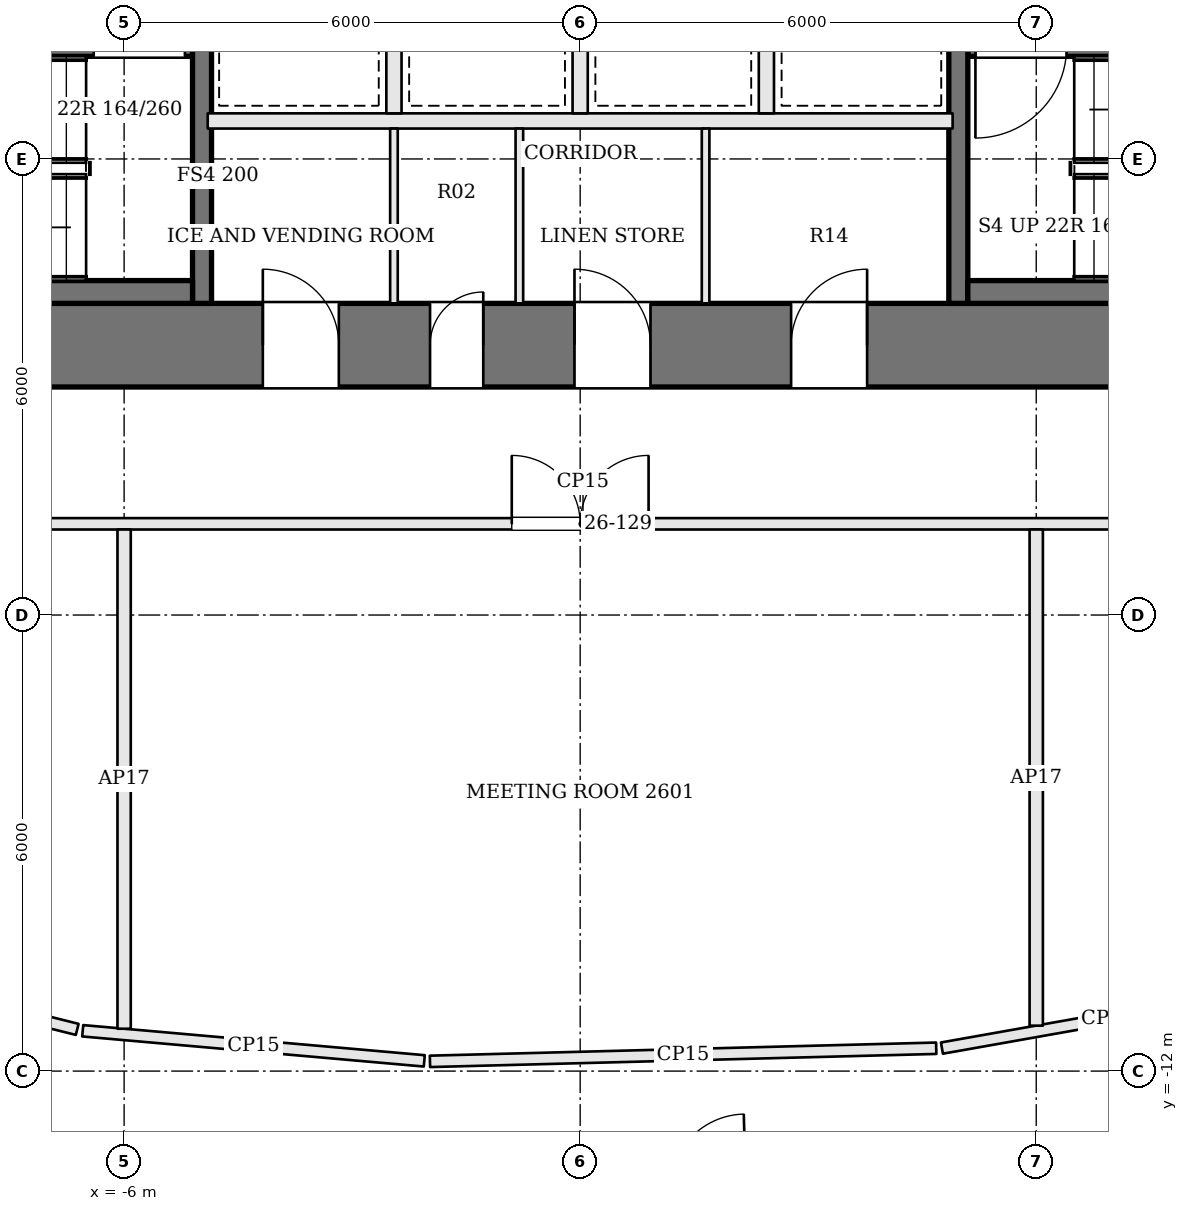
"""IFC4 building model, lengths in metres.
Left out: names, types, materials, properties, quantities, classifications, styles, units other than length and angle.
Written with IfcOpenShell. Run it as: python <this file> out.ifc"""

import sys

from ifc_helpers import new_model, si_unit, direction, frame, frame_2d, origin, place, context, subcontext, project, spatial, rectangle, extrude, element, fill, save


model = new_model("IFC4")
c1 = context("Model", 3, precision=1e-05, world=origin(), true_north=direction((0.0, 1.0)))
c2 = subcontext(c1, "Body", "Model", "MODEL_VIEW")
j1 = project(units=[si_unit("LENGTHUNIT", "METRE"), si_unit("PLANEANGLEUNIT", "RADIAN")], contexts=[c1])
p1 = place(None, origin())
s1 = spatial("IfcSite", under=j1, at=p1, CompositionType="ELEMENT")
p2 = place(p1, origin())
s2 = spatial("IfcBuilding", under=s1, at=p2, CompositionType="ELEMENT")
p3 = place(p2, frame((0.0, 0.0, 110.4)))
s3 = spatial("IfcBuildingStorey", under=s2, at=p3, CompositionType="ELEMENT", Elevation=110.4)
p4 = place(p3, frame((-13.0, -2.45, 0.0), z_axis=(0.0, 0.0, 1.0), x_axis=(1.0, 0.0, 0.0)))
e1 = element("IfcWall", 1, at=p4, inside=s3, PredefinedType="SHEAR", context=c2, shape_type="SweptSolid", body=[
    extrude(rectangle(XDim=26.0, YDim=1.1, at=frame_2d((13.0, 0.0))), origin(), (0.0, 0.0, 1.0), 3.6),
])
p5 = place(p4, frame((8.825, 0.0, 0.0)))
e2 = element("IfcOpeningElement", 2, at=p5, cuts=e1, PredefinedType="OPENING", context=c2, shape_type="SweptSolid", body=[
    extrude(rectangle(XDim=1.0, YDim=2.1, at=frame_2d((0.5, 1.05))), frame((0.0, 0.56, 0.0), z_axis=(0.0, -1.0, 0.0), x_axis=(1.0, 0.0, 0.0)), (0.0, 0.0, 1.0), 1.12),
])
p6 = place(p4, frame((11.025, 0.0, 0.0)))
e3 = element("IfcOpeningElement", 3, at=p6, cuts=e1, PredefinedType="OPENING", context=c2, shape_type="SweptSolid", body=[
    extrude(rectangle(XDim=0.7, YDim=2.1, at=frame_2d((0.35, 1.05))), frame((0.0, 0.56, 0.0), z_axis=(0.0, -1.0, 0.0), x_axis=(1.0, 0.0, 0.0)), (0.0, 0.0, 1.0), 1.12),
])
p7 = place(p4, frame((12.925, 0.0, 0.0)))
e4 = element("IfcOpeningElement", 4, at=p7, cuts=e1, PredefinedType="OPENING", context=c2, shape_type="SweptSolid", body=[
    extrude(rectangle(XDim=1.0, YDim=2.1, at=frame_2d((0.5, 1.05))), frame((0.0, 0.56, 0.0), z_axis=(0.0, -1.0, 0.0), x_axis=(1.0, 0.0, 0.0)), (0.0, 0.0, 1.0), 1.12),
])
p8 = place(p4, frame((15.775, 0.0, 0.0)))
e5 = element("IfcOpeningElement", 5, at=p8, cuts=e1, PredefinedType="OPENING", context=c2, shape_type="SweptSolid", body=[
    extrude(rectangle(XDim=1.0, YDim=2.1, at=frame_2d((0.5, 1.05))), frame((0.0, 0.56, 0.0), z_axis=(0.0, -1.0, 0.0), x_axis=(1.0, 0.0, 0.0)), (0.0, 0.0, 1.0), 1.12),
])
p9 = place(p3, frame((-11.9, 1.475, 0.0), z_axis=(0.0, 0.0, 1.0), x_axis=(1.0, 0.0, 0.0)))
e6 = element("IfcWall", 6, at=p9, inside=s3, PredefinedType="SOLIDWALL", context=c2, shape_type="SweptSolid", body=[
    extrude(rectangle(XDim=6.8, YDim=0.25, at=frame_2d((3.4, 0.0))), origin(), (0.0, 0.0, 1.0), 3.4),
])
p10 = place(p9, frame((5.5, 0.0, 0.0)))
e7 = element("IfcOpeningElement", 7, at=p10, cuts=e6, PredefinedType="OPENING", context=c2, shape_type="SweptSolid", body=[
    extrude(rectangle(XDim=1.2, YDim=2.1, at=frame_2d((0.6, 1.05))), frame((0.0, 0.135, 0.0), z_axis=(0.0, -1.0, 0.0), x_axis=(1.0, 0.0, 0.0)), (0.0, 0.0, 1.0), 0.27),
])
p11 = place(p3, frame((11.9, 1.475, 0.0), z_axis=(0.0, 0.0, 1.0), x_axis=(-1.0, 0.0, 0.0)))
e8 = element("IfcWall", 8, at=p11, inside=s3, PredefinedType="SOLIDWALL", context=c2, shape_type="SweptSolid", body=[
    extrude(rectangle(XDim=6.8, YDim=0.25, at=frame_2d((3.4, 0.0))), origin(), (0.0, 0.0, 1.0), 3.4),
])
p12 = place(p11, frame((5.5, 0.0, 0.0)))
e9 = element("IfcOpeningElement", 9, at=p12, cuts=e8, PredefinedType="OPENING", context=c2, shape_type="SweptSolid", body=[
    extrude(rectangle(XDim=1.2, YDim=2.1, at=frame_2d((0.6, 1.05))), frame((0.0, 0.135, 0.0), z_axis=(0.0, -1.0, 0.0), x_axis=(1.0, 0.0, 0.0)), (0.0, 0.0, 1.0), 0.27),
])
p13 = place(p3, frame((-4.975, -1.9, 0.0), z_axis=(0.0, 0.0, 1.0), x_axis=(0.0, 1.0, 0.0)))
e10 = element("IfcWall", 10, at=p13, inside=s3, PredefinedType="SOLIDWALL", context=c2, shape_type="SweptSolid", body=[
    extrude(rectangle(XDim=12.8, YDim=0.25, at=frame_2d((6.4, 0.0))), origin(), (0.0, 0.0, 1.0), 3.4),
])
p14 = place(p13, frame((4.95, 0.0, 0.0)))
e11 = element("IfcOpeningElement", 11, at=p14, cuts=e10, PredefinedType="OPENING", context=c2, shape_type="SweptSolid", body=[
    extrude(rectangle(XDim=1.2, YDim=2.1, at=frame_2d((0.6, 1.05))), frame((0.0, 0.135, 0.0), z_axis=(0.0, -1.0, 0.0), x_axis=(1.0, 0.0, 0.0)), (0.0, 0.0, 1.0), 0.27),
])
p15 = place(p3, frame((4.975, 10.9, 0.0), z_axis=(0.0, 0.0, 1.0), x_axis=(0.0, -1.0, 0.0)))
e12 = element("IfcWall", 12, at=p15, inside=s3, PredefinedType="SOLIDWALL", context=c2, shape_type="SweptSolid", body=[
    extrude(rectangle(XDim=12.8, YDim=0.25, at=frame_2d((6.4, 0.0))), origin(), (0.0, 0.0, 1.0), 3.4),
])
p16 = place(p15, frame((4.95, 0.0, 0.0)))
e13 = element("IfcOpeningElement", 13, at=p16, cuts=e12, PredefinedType="OPENING", context=c2, shape_type="SweptSolid", body=[
    extrude(rectangle(XDim=1.2, YDim=2.1, at=frame_2d((0.6, 1.05))), frame((0.0, 0.135, 0.0), z_axis=(0.0, -1.0, 0.0), x_axis=(1.0, 0.0, 0.0)), (0.0, 0.0, 1.0), 0.27),
])
for number, where, z_axis, x_axis in (
    (14, (-11.9, -1.75, 0.0), (0.0, 0.0, 1.0), (1.0, 0.0, 0.0)),
    (15, (11.9, -1.75, 0.0), (0.0, 0.0, 1.0), (-1.0, 0.0, 0.0)),
):
    element("IfcWall", number, at=place(p3, frame(where, z_axis=z_axis, x_axis=x_axis)), inside=s3, PredefinedType="SOLIDWALL", context=c2, shape_type="SweptSolid", body=[
        extrude(rectangle(XDim=6.8, YDim=0.3, at=frame_2d((3.4, 0.0))), origin(), (0.0, 0.0, 1.0), 3.4),
    ])
p17 = place(p3, frame((-4.9, 0.5, 0.0), z_axis=(0.0, 0.0, 1.0), x_axis=(1.0, 0.0, 0.0)))
e16 = element("IfcWall", 16, at=p17, inside=s3, PredefinedType="SOLIDWALL", context=c2, shape_type="SweptSolid", body=[
    extrude(rectangle(XDim=9.8, YDim=0.2, at=frame_2d((4.9, 0.0))), origin(), (0.0, 0.0, 1.0), 3.4),
])
for number, where, z_axis, x_axis in (
    (17, (-2.45, 0.6, 0.0), (0.0, 0.0, 1.0), (0.0, 1.0, 0.0)),
    (18, (0.0, 0.6, 0.0), (0.0, 0.0, 1.0), (0.0, 1.0, 0.0)),
    (19, (2.45, 0.6, 0.0), (0.0, 0.0, 1.0), (0.0, 1.0, 0.0)),
):
    element("IfcWall", number, at=place(p3, frame(where, z_axis=z_axis, x_axis=x_axis)), inside=s3, PredefinedType="SOLIDWALL", context=c2, shape_type="SweptSolid", body=[
        extrude(rectangle(XDim=2.2, YDim=0.2, at=frame_2d((1.1, 0.0))), origin(), (0.0, 0.0, 1.0), 3.4),
    ])
for number, where, z_axis, x_axis in (
    (20, (-2.45, -1.9, 0.0), (0.0, 0.0, 1.0), (0.0, 1.0, 0.0)),
    (21, (-0.8, -1.9, 0.0), (0.0, 0.0, 1.0), (0.0, 1.0, 0.0)),
    (22, (1.65, -1.9, 0.0), (0.0, 0.0, 1.0), (0.0, 1.0, 0.0)),
):
    element("IfcWall", number, at=place(p3, frame(where, z_axis=z_axis, x_axis=x_axis)), inside=s3, PredefinedType="PARTITIONING", context=c2, shape_type="SweptSolid", body=[
        extrude(rectangle(XDim=2.3, YDim=0.1, at=frame_2d((1.15, 0.0))), origin(), (0.0, 0.0, 1.0), 3.4),
    ])
p18 = place(p3, frame((-11.419, -12.096, 0.0), z_axis=(0.0, 0.0, 1.0), x_axis=(0.969625924548, -0.244592654109, 0.0)))
e23 = element("IfcWall", 23, at=p18, inside=s3, PredefinedType="PARTITIONING", context=c2, shape_type="SweptSolid", body=[
    extrude(rectangle(XDim=4.718, YDim=0.15, at=frame_2d((2.359, 0.0))), origin(), (0.0, 0.0, 1.0), 2.784),
])
p19 = place(p3, frame((5.015, -13.48, 0.0), z_axis=(0.0, 0.0, 1.0), x_axis=(0.984634298251, 0.174629031689, 0.0)))
e24 = element("IfcWall", 24, at=p19, inside=s3, PredefinedType="PARTITIONING", context=c2, shape_type="SweptSolid", body=[
    extrude(rectangle(XDim=3.928, YDim=0.15, at=frame_2d((1.964, 0.0))), origin(), (0.0, 0.0, 1.0), 2.784),
])
p20 = place(p19, frame((2.051, 0.0, 0.0)))
e25 = element("IfcOpeningElement", 25, at=p20, cuts=e24, PredefinedType="OPENING", context=c2, shape_type="SweptSolid", body=[
    extrude(rectangle(XDim=1.0, YDim=2.1, at=frame_2d((0.5, 1.05))), frame((0.0, 0.085, 0.0), z_axis=(0.0, -1.0, 0.0), x_axis=(1.0, 0.0, 0.0)), (0.0, 0.0, 1.0), 0.17),
])
p21 = place(p3, frame((9.115, -10.925, 0.0), z_axis=(0.0, 0.0, 1.0), x_axis=(-0.984632605417, -0.174638576352, 0.0)))
e26 = element("IfcWall", 26, at=p21, inside=s3, PredefinedType="PARTITIONING", context=c2, shape_type="SweptSolid", body=[
    extrude(rectangle(XDim=4.423, YDim=0.15, at=frame_2d((2.211, 0.0))), origin(), (0.0, 0.0, 1.0), 2.784),
])
p22 = place(p3, frame((4.684, -11.699, 0.0), z_axis=(0.0, 0.0, 1.0), x_axis=(-0.999663438204, -0.025942442425, 0.0)))
e27 = element("IfcWall", 27, at=p22, inside=s3, PredefinedType="PARTITIONING", context=c2, shape_type="SweptSolid", body=[
    extrude(rectangle(XDim=6.663, YDim=0.15, at=frame_2d((3.332, 0.0))), origin(), (0.0, 0.0, 1.0), 2.784),
])
p23 = place(p3, frame((-2.051, -11.865, 0.0), z_axis=(0.0, 0.0, 1.0), x_axis=(-0.996139599493, 0.087783246245, 0.0)))
e28 = element("IfcWall", 28, at=p23, inside=s3, PredefinedType="PARTITIONING", context=c2, shape_type="SweptSolid", body=[
    extrude(rectangle(XDim=4.511, YDim=0.15, at=frame_2d((2.255, 0.0))), origin(), (0.0, 0.0, 1.0), 2.784),
])
p24 = place(p3, frame((-6.617, -11.451, 0.0), z_axis=(0.0, 0.0, 1.0), x_axis=(-0.969987441267, 0.243155020069, 0.0)))
e29 = element("IfcWall", 29, at=p24, inside=s3, PredefinedType="PARTITIONING", context=c2, shape_type="SweptSolid", body=[
    extrude(rectangle(XDim=4.359, YDim=0.15, at=frame_2d((2.179, 0.0))), origin(), (0.0, 0.0, 1.0), 2.784),
])
p25 = place(p3, frame((-14.725, -4.8, 0.0), z_axis=(0.0, 0.0, 1.0), x_axis=(1.0, 0.0, 0.0)))
e30 = element("IfcWall", 30, at=p25, inside=s3, PredefinedType="PARTITIONING", context=c2, shape_type="SweptSolid", body=[
    extrude(rectangle(XDim=29.525, YDim=0.15, at=frame_2d((14.763, 0.0))), origin(), (0.0, 0.0, 1.0), 2.784),
])
p26 = place(p25, frame((3.425, 0.0, 0.0)))
e31 = element("IfcOpeningElement", 31, at=p26, cuts=e30, PredefinedType="OPENING", context=c2, shape_type="SweptSolid", body=[
    extrude(rectangle(XDim=1.8, YDim=2.1, at=frame_2d((0.9, 1.05))), frame((0.0, 0.085, 0.0), z_axis=(0.0, -1.0, 0.0), x_axis=(1.0, 0.0, 0.0)), (0.0, 0.0, 1.0), 0.17),
])
p27 = place(p25, frame((13.825, 0.0, 0.0)))
e32 = element("IfcOpeningElement", 32, at=p27, cuts=e30, PredefinedType="OPENING", context=c2, shape_type="SweptSolid", body=[
    extrude(rectangle(XDim=1.8, YDim=2.1, at=frame_2d((0.9, 1.05))), frame((0.0, 0.085, 0.0), z_axis=(0.0, -1.0, 0.0), x_axis=(1.0, 0.0, 0.0)), (0.0, 0.0, 1.0), 0.17),
])
p28 = place(p25, frame((24.225, 0.0, 0.0)))
e33 = element("IfcOpeningElement", 33, at=p28, cuts=e30, PredefinedType="OPENING", context=c2, shape_type="SweptSolid", body=[
    extrude(rectangle(XDim=1.8, YDim=2.1, at=frame_2d((0.9, 1.05))), frame((0.0, 0.085, 0.0), z_axis=(0.0, -1.0, 0.0), x_axis=(1.0, 0.0, 0.0)), (0.0, 0.0, 1.0), 0.17),
])
p29 = place(p3, frame((-6.0, -11.442, 0.0), z_axis=(0.0, 0.0, 1.0), x_axis=(0.0, 1.0, 0.0)))
e34 = element("IfcWall", 34, at=p29, inside=s3, PredefinedType="PARTITIONING", context=c2, shape_type="SweptSolid", body=[
    extrude(rectangle(XDim=6.567, YDim=0.175, at=frame_2d((3.284, 0.0))), origin(), (0.0, 0.0, 1.0), 2.784),
])
p30 = place(p3, frame((6.0, -11.402, 0.0), z_axis=(0.0, 0.0, 1.0), x_axis=(0.0, 1.0, 0.0)))
e35 = element("IfcWall", 35, at=p30, inside=s3, PredefinedType="PARTITIONING", context=c2, shape_type="SweptSolid", body=[
    extrude(rectangle(XDim=6.527, YDim=0.175, at=frame_2d((3.264, 0.0))), origin(), (0.0, 0.0, 1.0), 2.784),
])
p31 = place(p5, origin())
e36 = element("IfcDoor", 36, at=p31, inside=s3, OperationType="SINGLE_SWING_LEFT", PredefinedType="DOOR", context=c2, shape_type="SweptSolid", body=[
    extrude(rectangle(XDim=1.0, YDim=2.1, at=frame_2d((0.5, 1.05))), frame((0.0, 0.025, 0.0), z_axis=(0.0, -1.0, 0.0), x_axis=(1.0, 0.0, 0.0)), (0.0, 0.0, 1.0), 0.05),
])
fill(e2, e36)
p32 = place(p6, origin())
e37 = element("IfcDoor", 37, at=p32, inside=s3, OperationType="SINGLE_SWING_RIGHT", PredefinedType="DOOR", context=c2, shape_type="SweptSolid", body=[
    extrude(rectangle(XDim=0.7, YDim=2.1, at=frame_2d((0.35, 1.05))), frame((0.0, 0.025, 0.0), z_axis=(0.0, -1.0, 0.0), x_axis=(1.0, 0.0, 0.0)), (0.0, 0.0, 1.0), 0.05),
])
fill(e3, e37)
p33 = place(p7, origin())
e38 = element("IfcDoor", 38, at=p33, inside=s3, OperationType="SINGLE_SWING_LEFT", PredefinedType="DOOR", context=c2, shape_type="SweptSolid", body=[
    extrude(rectangle(XDim=1.0, YDim=2.1, at=frame_2d((0.5, 1.05))), frame((0.0, 0.025, 0.0), z_axis=(0.0, -1.0, 0.0), x_axis=(1.0, 0.0, 0.0)), (0.0, 0.0, 1.0), 0.05),
])
fill(e4, e38)
p34 = place(p8, origin())
e39 = element("IfcDoor", 39, at=p34, inside=s3, OperationType="SINGLE_SWING_RIGHT", PredefinedType="DOOR", context=c2, shape_type="SweptSolid", body=[
    extrude(rectangle(XDim=1.0, YDim=2.1, at=frame_2d((0.5, 1.05))), frame((0.0, 0.025, 0.0), z_axis=(0.0, -1.0, 0.0), x_axis=(1.0, 0.0, 0.0)), (0.0, 0.0, 1.0), 0.05),
])
fill(e5, e39)
p35 = place(p27, origin())
e40 = element("IfcDoor", 40, at=p35, inside=s3, OperationType="DOUBLE_DOOR_SINGLE_SWING", PredefinedType="DOOR", context=c2, shape_type="SweptSolid", body=[
    extrude(rectangle(XDim=1.8, YDim=2.1, at=frame_2d((0.9, 1.05))), frame((0.0, 0.025, 0.0), z_axis=(0.0, -1.0, 0.0), x_axis=(1.0, 0.0, 0.0)), (0.0, 0.0, 1.0), 0.05),
])
fill(e32, e40)
save(model, sys.argv[1])
